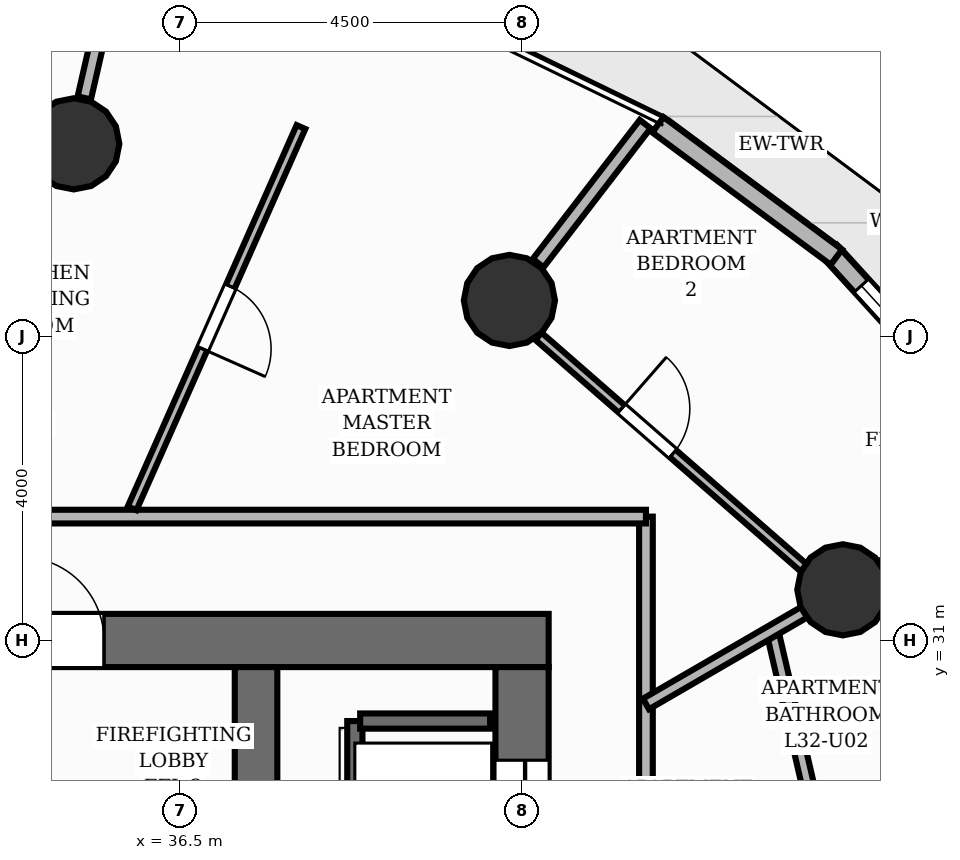
"""IFC4 building model, lengths in metres.
Left out: names, types, materials, properties, quantities, classifications, styles, units other than length and angle.
Written with IfcOpenShell. Run it as: python <this file> out.ifc"""

import sys

from ifc_helpers import new_model, si_unit, direction, frame, frame_2d, origin, origin_2d, place, context, subcontext, project, spatial, rectangle, circle, extrude, element, fill, save


model = new_model("IFC4")
c1 = context("Model", 3, precision=1e-05, world=origin(), true_north=direction((0.0, 1.0)))
c2 = subcontext(c1, "Body", "Model", "MODEL_VIEW")
j1 = project(units=[si_unit("LENGTHUNIT", "METRE"), si_unit("PLANEANGLEUNIT", "RADIAN")], contexts=[c1])
p1 = place(None, origin())
s1 = spatial("IfcSite", under=j1, at=p1, CompositionType="ELEMENT")
p2 = place(p1, origin())
s2 = spatial("IfcBuilding", under=s1, at=p2, CompositionType="ELEMENT")
p3 = place(p2, frame((0.0, 0.0, 109.28)))
s3 = spatial("IfcBuildingStorey", under=s2, at=p3, CompositionType="ELEMENT", Elevation=109.28)
p4 = place(p3, frame((22.65, 31.0, 0.0), z_axis=(0.0, 0.0, 1.0), x_axis=(1.0, 0.0, 0.0)))
e1 = element("IfcWall", 1, at=p4, inside=s3, PredefinedType="SHEAR", context=c2, shape_type="SweptSolid", body=[
    extrude(rectangle(XDim=18.7, YDim=0.7, at=frame_2d((9.35, 0.0))), origin(), (0.0, 0.0, 1.0), 3.2),
])
p5 = place(p4, frame((11.75, 0.0, 0.0)))
e2 = element("IfcOpeningElement", 2, at=p5, cuts=e1, PredefinedType="OPENING", context=c2, shape_type="SweptSolid", body=[
    extrude(rectangle(XDim=1.1, YDim=2.15, at=frame_2d((0.55, 1.075))), frame((0.0, 0.36, 0.0), z_axis=(0.0, -1.0, 0.0), x_axis=(1.0, 0.0, 0.0)), (0.0, 0.0, 1.0), 0.72),
])
p6 = place(p3, frame((41.0, 17.35, 0.0), z_axis=(0.0, 0.0, 1.0), x_axis=(0.0, 1.0, 0.0)))
e3 = element("IfcWall", 3, at=p6, inside=s3, PredefinedType="SHEAR", context=c2, shape_type="SweptSolid", body=[
    extrude(rectangle(XDim=13.3, YDim=0.7, at=frame_2d((6.65, 0.0))), origin(), (0.0, 0.0, 1.0), 3.2),
])
p7 = place(p6, frame((1.225, 0.0, 0.0)))
e4 = element("IfcOpeningElement", 4, at=p7, cuts=e3, PredefinedType="OPENING", context=c2, shape_type="SweptSolid", body=[
    extrude(rectangle(XDim=1.05, YDim=2.0, at=frame_2d((0.525, 1.0))), frame((0.0, 0.36, 0.0), z_axis=(0.0, -1.0, 0.0), x_axis=(1.0, 0.0, 0.0)), (0.0, 0.0, 1.0), 0.72),
])
p8 = place(p6, frame((4.475, 0.0, 0.0)))
e5 = element("IfcOpeningElement", 5, at=p8, cuts=e3, PredefinedType="OPENING", context=c2, shape_type="SweptSolid", body=[
    extrude(rectangle(XDim=1.05, YDim=2.0, at=frame_2d((0.525, 1.0))), frame((0.0, 0.36, 0.0), z_axis=(0.0, -1.0, 0.0), x_axis=(1.0, 0.0, 0.0)), (0.0, 0.0, 1.0), 0.72),
])
p9 = place(p6, frame((7.775, 0.0, 0.0)))
e6 = element("IfcOpeningElement", 6, at=p9, cuts=e3, PredefinedType="OPENING", context=c2, shape_type="SweptSolid", body=[
    extrude(rectangle(XDim=1.05, YDim=2.0, at=frame_2d((0.525, 1.0))), frame((0.0, 0.36, 0.0), z_axis=(0.0, -1.0, 0.0), x_axis=(1.0, 0.0, 0.0)), (0.0, 0.0, 1.0), 0.72),
])
p10 = place(p6, frame((11.025, 0.0, 0.0)))
e7 = element("IfcOpeningElement", 7, at=p10, cuts=e3, PredefinedType="OPENING", context=c2, shape_type="SweptSolid", body=[
    extrude(rectangle(XDim=1.05, YDim=2.0, at=frame_2d((0.525, 1.0))), frame((0.0, 0.36, 0.0), z_axis=(0.0, -1.0, 0.0), x_axis=(1.0, 0.0, 0.0)), (0.0, 0.0, 1.0), 0.72),
])
p11 = place(p3, frame((37.5, 17.35, 0.0), z_axis=(0.0, 0.0, 1.0), x_axis=(0.0, 1.0, 0.0)))
e8 = element("IfcWall", 8, at=p11, inside=s3, PredefinedType="SHEAR", context=c2, shape_type="SweptSolid", body=[
    extrude(rectangle(XDim=13.3, YDim=0.56, at=frame_2d((6.65, 0.0))), origin(), (0.0, 0.0, 1.0), 3.2),
])
for number, where, z_axis, x_axis in (
    (9, (45.22, 31.667, 0.0), (0.0, 0.0, 1.0), (1.0, 0.0, 0.0)),
    (10, (40.833, 35.474, 0.0), (0.0, 0.0, 1.0), (1.0, 0.0, 0.0)),
    (11, (35.102, 37.535, 0.0), (0.0, 0.0, 1.0), (1.0, 0.0, 0.0)),
):
    element("IfcColumn", number, at=place(p3, frame(where, z_axis=z_axis, x_axis=x_axis)), inside=s3, PredefinedType="COLUMN", context=c2, shape_type="SweptSolid", body=[
        extrude(circle(Radius=0.6, at=origin_2d()), origin(), (0.0, 0.0, 1.0), 3.2),
    ])
p12 = place(p3, frame((45.051, 36.121, 0.0), z_axis=(0.0, 0.0, 1.0), x_axis=(0.673691100196, -0.739013059098, 0.0)))
e12 = element("IfcWall", 12, at=p12, inside=s3, PredefinedType="SOLIDWALL", context=c2, shape_type="SweptSolid", body=[
    extrude(rectangle(XDim=2.874, YDim=0.25, at=frame_2d((1.437, 0.0))), origin(), (0.0, 0.0, 1.0), 2.8),
])
p13 = place(p12, frame((0.612, 0.0, 0.85)))
e13 = element("IfcOpeningElement", 13, at=p13, cuts=e12, PredefinedType="OPENING", context=c2, shape_type="SweptSolid", body=[
    extrude(rectangle(XDim=1.65, YDim=1.55, at=frame_2d((0.825, 0.775))), frame((0.0, 0.135, 0.0), z_axis=(0.0, -1.0, 0.0), x_axis=(1.0, 0.0, 0.0)), (0.0, 0.0, 1.0), 0.27),
])
p14 = place(p3, frame((42.787, 37.785, 0.0), z_axis=(0.0, 0.0, 1.0), x_axis=(0.803255279066, -0.595634918933, 0.0)))
e14 = element("IfcWall", 14, at=p14, inside=s3, PredefinedType="SOLIDWALL", context=c2, shape_type="SweptSolid", body=[
    extrude(rectangle(XDim=2.923, YDim=0.25, at=frame_2d((1.462, 0.0))), origin(), (0.0, 0.0, 1.0), 2.8),
])
p15 = place(p3, frame((38.8, 18.06, 0.0), z_axis=(0.0, 0.0, 1.0), x_axis=(0.0, 1.0, 0.0)))
e15 = element("IfcWall", 15, at=p15, inside=s3, PredefinedType="SHEAR", context=c2, shape_type="SweptSolid", body=[
    extrude(rectangle(XDim=11.88, YDim=0.2, at=frame_2d((5.94, 0.0))), origin(), (0.0, 0.0, 1.0), 3.2),
])
p16 = place(p3, frame((38.87, 29.94, 0.0), z_axis=(0.0, 0.0, 1.0), x_axis=(1.0, 0.0, 0.0)))
e16 = element("IfcWall", 16, at=p16, inside=s3, PredefinedType="SHEAR", context=c2, shape_type="SweptSolid", body=[
    extrude(rectangle(XDim=1.71, YDim=0.2, at=frame_2d((0.855, 0.0))), origin(), (0.0, 0.0, 1.0), 3.2),
])
p17 = place(p3, frame((45.757, 31.978, 0.0), z_axis=(0.0, 0.0, 1.0), x_axis=(0.865046864493, 0.501691062539, 0.0)))
e17 = element("IfcWall", 17, at=p17, inside=s3, PredefinedType="PARTITIONING", context=c2, shape_type="SweptSolid", body=[
    extrude(rectangle(XDim=2.028, YDim=0.18, at=frame_2d((1.014, 0.0))), origin(), (0.0, 0.0, 1.0), 2.1),
])
p18 = place(p3, frame((41.212, 35.966, 0.0), z_axis=(0.0, 0.0, 1.0), x_axis=(0.610007255548, 0.792395827967, 0.0)))
e18 = element("IfcWall", 18, at=p18, inside=s3, PredefinedType="PARTITIONING", context=c2, shape_type="SweptSolid", body=[
    extrude(rectangle(XDim=2.308, YDim=0.18, at=frame_2d((1.154, 0.0))), origin(), (0.0, 0.0, 1.0), 2.1),
])
p19 = place(p3, frame((35.24, 38.139, 0.0), z_axis=(0.0, 0.0, 1.0), x_axis=(0.2234127464, 0.974723932581, 0.0)))
e19 = element("IfcWall", 19, at=p19, inside=s3, PredefinedType="PARTITIONING", context=c2, shape_type="SweptSolid", body=[
    extrude(rectangle(XDim=1.849, YDim=0.18, at=frame_2d((0.924, 0.0))), origin(), (0.0, 0.0, 1.0), 2.1),
])
p20 = place(p3, frame((42.63, 32.63, 0.0), z_axis=(0.0, 0.0, 1.0), x_axis=(0.0, -1.0, 0.0)))
e20 = element("IfcWall", 20, at=p20, inside=s3, PredefinedType="PARTITIONING", context=c2, shape_type="SweptSolid", body=[
    extrude(rectangle(XDim=6.23, YDim=0.18, at=frame_2d((3.115, 0.0))), origin(), (0.0, 0.0, 1.0), 2.795),
])
p21 = place(p3, frame((22.734, 32.63, 0.0), z_axis=(0.0, 0.0, 1.0), x_axis=(1.0, 0.0, 0.0)))
e21 = element("IfcWall", 21, at=p21, inside=s3, PredefinedType="PARTITIONING", context=c2, shape_type="SweptSolid", body=[
    extrude(rectangle(XDim=19.896, YDim=0.18, at=frame_2d((9.948, 0.0))), origin(), (0.0, 0.0, 1.0), 2.795),
])
p22 = place(p21, frame((11.004, 0.0, 0.0)))
e22 = element("IfcOpeningElement", 22, at=p22, cuts=e21, PredefinedType="OPENING", context=c2, shape_type="SweptSolid", body=[
    extrude(rectangle(XDim=1.05, YDim=2.0, at=frame_2d((0.525, 1.0))), frame((0.0, 0.1, 0.0), z_axis=(0.0, -1.0, 0.0), x_axis=(1.0, 0.0, 0.0)), (0.0, 0.0, 1.0), 0.2),
])
p23 = place(p3, frame((44.838, 28.77, 0.0), z_axis=(0.0, 0.0, 1.0), x_axis=(0.97949547816, 0.201466146695, 0.0)))
e23 = element("IfcWall", 23, at=p23, inside=s3, PredefinedType="PLUMBINGWALL", context=c2, shape_type="SweptSolid", body=[
    extrude(rectangle(XDim=4.315, YDim=0.16, at=frame_2d((2.158, 0.0))), origin(), (0.0, 0.0, 1.0), 2.795),
])
p24 = place(p23, frame((1.708, 0.0, 0.0)))
e24 = element("IfcOpeningElement", 24, at=p24, cuts=e23, PredefinedType="OPENING", context=c2, shape_type="SweptSolid", body=[
    extrude(rectangle(XDim=0.9, YDim=2.1, at=frame_2d((0.45, 1.05))), frame((0.0, 0.09, 0.0), z_axis=(0.0, -1.0, 0.0), x_axis=(1.0, 0.0, 0.0)), (0.0, 0.0, 1.0), 0.18),
])
p25 = place(p3, frame((45.174, 27.315, 0.0), z_axis=(0.0, 0.0, 1.0), x_axis=(-0.225561032487, 0.974229039099, 0.0)))
e25 = element("IfcWall", 25, at=p25, inside=s3, PredefinedType="PLUMBINGWALL", context=c2, shape_type="SweptSolid", body=[
    extrude(rectangle(XDim=3.914, YDim=0.16, at=frame_2d((1.957, 0.0))), origin(), (0.0, 0.0, 1.0), 2.795),
])
p26 = place(p25, frame((0.266, 0.0, 0.0)))
e26 = element("IfcOpeningElement", 26, at=p26, cuts=e25, PredefinedType="OPENING", context=c2, shape_type="SweptSolid", body=[
    extrude(rectangle(XDim=0.9, YDim=2.1, at=frame_2d((0.45, 1.05))), frame((0.0, 0.09, 0.0), z_axis=(0.0, -1.0, 0.0), x_axis=(1.0, 0.0, 0.0)), (0.0, 0.0, 1.0), 0.18),
])
p27 = place(p3, frame((42.63, 30.165, 0.0), z_axis=(0.0, 0.0, 1.0), x_axis=(0.865092804374, 0.501611841786, 0.0)))
e27 = element("IfcWall", 27, at=p27, inside=s3, PredefinedType="PLUMBINGWALL", context=c2, shape_type="SweptSolid", body=[
    extrude(rectangle(XDim=2.407, YDim=0.16, at=frame_2d((1.204, 0.0))), origin(), (0.0, 0.0, 1.0), 2.1),
])
p28 = place(p3, frame((38.091, 37.756, 0.0), z_axis=(0.0, 0.0, 1.0), x_axis=(-0.404874602407, -0.914372219791, 0.0)))
e28 = element("IfcWall", 28, at=p28, inside=s3, PredefinedType="PARTITIONING", context=c2, shape_type="SweptSolid", body=[
    extrude(rectangle(XDim=5.486, YDim=0.125, at=frame_2d((2.743, 0.0))), origin(), (0.0, 0.0, 1.0), 2.795),
])
p29 = place(p28, frame((2.293, 0.0, 0.0)))
e29 = element("IfcOpeningElement", 29, at=p29, cuts=e28, PredefinedType="OPENING", context=c2, shape_type="SweptSolid", body=[
    extrude(rectangle(XDim=0.9, YDim=2.1, at=frame_2d((0.45, 1.05))), frame((0.0, 0.073, 0.0), z_axis=(0.0, -1.0, 0.0), x_axis=(1.0, 0.0, 0.0)), (0.0, 0.0, 1.0), 0.145),
])
p30 = place(p3, frame((41.216, 35.003, 0.0), z_axis=(0.0, 0.0, 1.0), x_axis=(0.753372011099, -0.657594565741, 0.0)))
e30 = element("IfcWall", 30, at=p30, inside=s3, PredefinedType="PARTITIONING", context=c2, shape_type="SweptSolid", body=[
    extrude(rectangle(XDim=4.637, YDim=0.125, at=frame_2d((2.318, 0.0))), origin(), (0.0, 0.0, 1.0), 2.243),
])
p31 = place(p30, frame((1.448, 0.0, 0.0)))
e31 = element("IfcOpeningElement", 31, at=p31, cuts=e30, PredefinedType="OPENING", context=c2, shape_type="SweptSolid", body=[
    extrude(rectangle(XDim=0.9, YDim=2.1, at=frame_2d((0.45, 1.05))), frame((0.0, 0.073, 0.0), z_axis=(0.0, -1.0, 0.0), x_axis=(1.0, 0.0, 0.0)), (0.0, 0.0, 1.0), 0.145),
])
p32 = place(p13, origin())
e32 = element("IfcWindow", 32, at=p32, inside=s3, PartitioningType="SINGLE_PANEL", PredefinedType="WINDOW", context=c2, shape_type="SweptSolid", body=[
    extrude(rectangle(XDim=1.65, YDim=1.55, at=frame_2d((0.825, 0.775))), frame((0.0, 0.03, 0.0), z_axis=(0.0, -1.0, 0.0), x_axis=(1.0, 0.0, 0.0)), (0.0, 0.0, 1.0), 0.06),
])
fill(e13, e32)
p33 = place(p5, origin())
e33 = element("IfcDoor", 33, at=p33, inside=s3, OperationType="SINGLE_SWING_LEFT", PredefinedType="DOOR", context=c2, shape_type="SweptSolid", body=[
    extrude(rectangle(XDim=1.1, YDim=2.15, at=frame_2d((0.55, 1.075))), frame((0.0, 0.025, 0.0), z_axis=(0.0, -1.0, 0.0), x_axis=(1.0, 0.0, 0.0)), (0.0, 0.0, 1.0), 0.05),
])
fill(e2, e33)
p34 = place(p10, origin())
e34 = element("IfcDoor", 34, at=p34, inside=s3, OperationType="DOUBLE_DOOR_SLIDING", PredefinedType="DOOR", context=c2, shape_type="SweptSolid", body=[
    extrude(rectangle(XDim=1.05, YDim=2.0, at=frame_2d((0.525, 1.0))), frame((0.0, 0.025, 0.0), z_axis=(0.0, -1.0, 0.0), x_axis=(1.0, 0.0, 0.0)), (0.0, 0.0, 1.0), 0.05),
])
fill(e7, e34)
p35 = place(p29, origin())
e35 = element("IfcDoor", 35, at=p35, inside=s3, OperationType="SINGLE_SWING_RIGHT", PredefinedType="DOOR", context=c2, shape_type="SweptSolid", body=[
    extrude(rectangle(XDim=0.9, YDim=2.1, at=frame_2d((0.45, 1.05))), frame((0.0, 0.025, 0.0), z_axis=(0.0, -1.0, 0.0), x_axis=(1.0, 0.0, 0.0)), (0.0, 0.0, 1.0), 0.05),
])
fill(e29, e35)
p36 = place(p31, origin())
e36 = element("IfcDoor", 36, at=p36, inside=s3, OperationType="SINGLE_SWING_LEFT", PredefinedType="DOOR", context=c2, shape_type="SweptSolid", body=[
    extrude(rectangle(XDim=0.9, YDim=2.1, at=frame_2d((0.45, 1.05))), frame((0.0, 0.025, 0.0), z_axis=(0.0, -1.0, 0.0), x_axis=(1.0, 0.0, 0.0)), (0.0, 0.0, 1.0), 0.05),
])
fill(e31, e36)
save(model, sys.argv[1])
